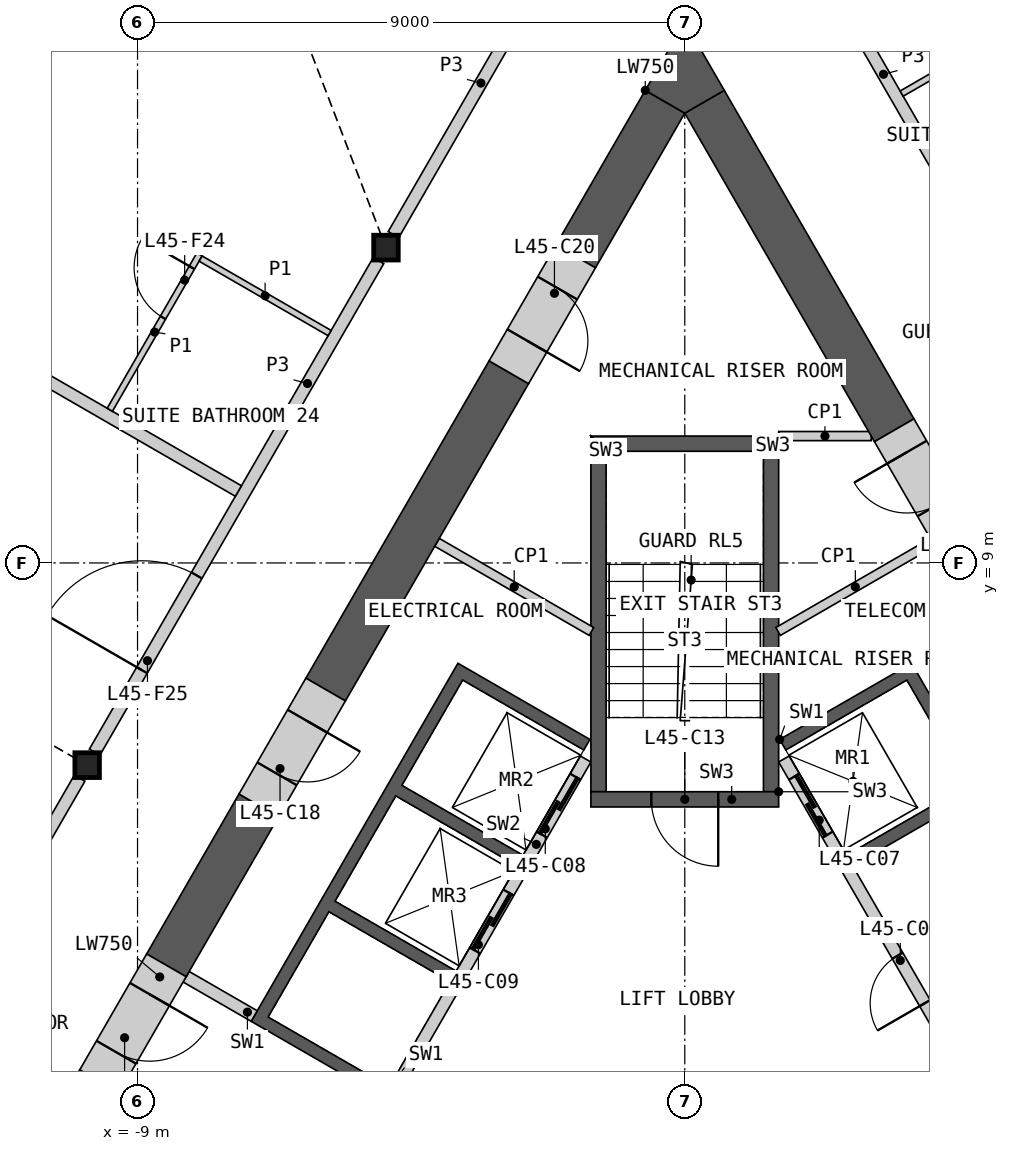
"""IFC4 building model, lengths in metres.
Left out: names, types, materials, properties, quantities, classifications, styles, units other than length and angle.
Written with IfcOpenShell. Run it as: python <this file> out.ifc"""

import sys

from ifc_helpers import new_model, si_unit, direction, frame, frame_2d, origin, origin_2d, place, context, subcontext, project, spatial, polyline, rectangle, i_section, outline, extrude, element, fill, save


model = new_model("IFC4")
c1 = context("Model", 3, precision=1e-05, world=origin(), true_north=direction((0.0, 1.0)))
c2 = subcontext(c1, "Body", "Model", "MODEL_VIEW")
j1 = project(units=[si_unit("LENGTHUNIT", "METRE"), si_unit("PLANEANGLEUNIT", "RADIAN")], contexts=[c1])
p1 = place(None, origin())
s1 = spatial("IfcSite", under=j1, at=p1, CompositionType="ELEMENT")
p2 = place(p1, origin())
s2 = spatial("IfcBuilding", under=s1, at=p2, CompositionType="ELEMENT")
p3 = place(p2, frame((0.0, 0.0, 205.2)))
s3 = spatial("IfcBuildingStorey", under=s2, at=p3, CompositionType="ELEMENT", Elevation=205.2)
for number, where, z_axis, x_axis in (
    (1, (-4.914, 14.186, 0.0), (0.0, 0.0, 1.0), (1.0, 0.0, 0.0)),
    (2, (-9.828, 5.675, 0.0), (0.0, 0.0, 1.0), (1.0, 0.0, 0.0)),
):
    element("IfcColumn", number, at=place(p3, frame(where, z_axis=z_axis, x_axis=x_axis)), inside=s3, PredefinedType="COLUMN", context=c2, shape_type="SweptSolid", body=[
        extrude(i_section(OverallWidth=0.404, OverallDepth=0.407, WebThickness=0.027, FlangeThickness=0.044, at=origin_2d()), origin(), (0.0, 0.0, 1.0), 3.6),
    ])
p4 = place(p3, origin())
e3 = element("IfcWall", 3, at=p4, inside=s3, PredefinedType="SHEAR", context=c2, shape_type="SweptSolid", body=[
    extrude(outline(polyline([(1.561, 6.097), (3.731, 7.35), (7.131, 1.461), (4.96, 0.208), (4.861, 0.381), (6.852, 1.531), (4.752, 5.169), (2.76, 4.019), (2.66, 4.192), (4.652, 5.342), (3.652, 7.074), (1.66, 5.924), (1.561, 6.097)])), origin(), (0.0, 0.0, 1.0), 3.25),
])
p5 = place(p3, frame((5.817, -1.476, 0.0), z_axis=(0.0, 0.0, 1.0), x_axis=(-0.500002616675, 0.866023893041, 0.0)))
e4 = element("IfcWall", 4, at=p5, inside=s3, PredefinedType="SOLIDWALL", context=c2, shape_type="SweptSolid", body=[
    extrude(rectangle(XDim=8.373, YDim=0.2, at=frame_2d((4.187, 0.0))), origin(), (0.0, 0.0, 1.0), 3.25),
])
p6 = place(p5, frame((0.437, 0.0, 0.0)))
e5 = element("IfcOpeningElement", 5, at=p6, cuts=e4, PredefinedType="OPENING", context=c2, shape_type="SweptSolid", body=[
    extrude(rectangle(XDim=0.9, YDim=2.1, at=frame_2d((0.45, 1.05))), frame((0.0, 0.11, 0.0), z_axis=(0.0, -1.0, 0.0), x_axis=(1.0, 0.0, 0.0)), (0.0, 0.0, 1.0), 0.22),
])
p7 = place(p5, frame((3.737, 0.0, 0.0)))
e6 = element("IfcOpeningElement", 6, at=p7, cuts=e4, PredefinedType="OPENING", context=c2, shape_type="SweptSolid", body=[
    extrude(rectangle(XDim=0.9, YDim=2.1, at=frame_2d((0.45, 1.05))), frame((0.0, 0.11, 0.0), z_axis=(0.0, -1.0, 0.0), x_axis=(1.0, 0.0, 0.0)), (0.0, 0.0, 1.0), 0.22),
])
p8 = place(p5, frame((6.937, 0.0, 0.0)))
e7 = element("IfcOpeningElement", 7, at=p8, cuts=e4, PredefinedType="OPENING", context=c2, shape_type="SweptSolid", body=[
    extrude(rectangle(XDim=1.1, YDim=2.1, at=frame_2d((0.55, 1.05))), frame((0.0, 0.11, 0.0), z_axis=(0.0, -1.0, 0.0), x_axis=(1.0, 0.0, 0.0)), (0.0, 0.0, 1.0), 0.22),
])
p9 = place(p3, origin())
e8 = element("IfcWall", 8, at=p9, inside=s3, PredefinedType="SHEAR", context=c2, shape_type="SweptSolid", body=[
    extrude(outline(polyline([(-4.96, 0.208), (-7.131, 1.461), (-3.731, 7.35), (-1.561, 6.097), (-1.66, 5.924), (-3.652, 7.074), (-4.652, 5.342), (-2.66, 4.192), (-2.76, 4.019), (-4.752, 5.169), (-5.752, 3.437), (-3.76, 2.287), (-3.861, 2.113), (-5.852, 3.263), (-6.852, 1.531), (-4.861, 0.381), (-4.96, 0.208)])), origin(), (0.0, 0.0, 1.0), 3.25),
])
p10 = place(p3, frame((-1.631, 5.776, 0.0), z_axis=(0.0, 0.0, 1.0), x_axis=(-0.499992876559, -0.866029516466, 0.0)))
e9 = element("IfcWall", 9, at=p10, inside=s3, PredefinedType="SOLIDWALL", context=c2, shape_type="SweptSolid", body=[
    extrude(rectangle(XDim=6.486, YDim=0.2, at=frame_2d((3.243, 0.0))), origin(), (0.0, 0.0, 1.0), 3.25),
])
p11 = place(p10, frame((0.337, 0.0, 0.0)))
e10 = element("IfcOpeningElement", 10, at=p11, cuts=e9, PredefinedType="OPENING", context=c2, shape_type="SweptSolid", body=[
    extrude(rectangle(XDim=1.1, YDim=2.1, at=frame_2d((0.55, 1.05))), frame((0.0, 0.11, 0.0), z_axis=(0.0, -1.0, 0.0), x_axis=(1.0, 0.0, 0.0)), (0.0, 0.0, 1.0), 0.22),
])
p12 = place(p10, frame((2.537, 0.0, 0.0)))
e11 = element("IfcOpeningElement", 11, at=p12, cuts=e9, PredefinedType="OPENING", context=c2, shape_type="SweptSolid", body=[
    extrude(rectangle(XDim=1.1, YDim=2.1, at=frame_2d((0.55, 1.05))), frame((0.0, 0.11, 0.0), z_axis=(0.0, -1.0, 0.0), x_axis=(1.0, 0.0, 0.0)), (0.0, 0.0, 1.0), 0.22),
])
p13 = place(p3, frame((-7.081, 1.548, 0.0), z_axis=(0.0, 0.0, 1.0), x_axis=(-0.866003189247, 0.500038474733, 0.0)))
e12 = element("IfcWall", 12, at=p13, inside=s3, PredefinedType="SHEAR", context=c2, shape_type="SweptSolid", body=[
    extrude(rectangle(XDim=1.293, YDim=0.2, at=frame_2d((0.646, 0.0))), origin(), (0.0, 0.0, 1.0), 3.25),
])
p14 = place(p3, origin())
e13 = element("IfcWall", 13, at=p14, inside=s3, PredefinedType="SHEAR", context=c2, shape_type="SweptSolid", body=[
    extrude(outline(polyline([(1.544, 5.237), (1.544, 11.087), (1.294, 10.837), (1.294, 5.237), (1.544, 5.237)])), origin(), (0.0, 0.0, 1.0), 3.25),
])
p15 = place(p3, origin())
e14 = element("IfcWall", 14, at=p15, inside=s3, PredefinedType="SHEAR", context=c2, shape_type="SweptSolid", body=[
    extrude(outline(polyline([(1.544, 11.087), (-1.544, 11.087), (-1.294, 10.837), (1.294, 10.837), (1.544, 11.087)])), origin(), (0.0, 0.0, 1.0), 3.25),
])
p16 = place(p3, origin())
e15 = element("IfcWall", 15, at=p16, inside=s3, PredefinedType="SHEAR", context=c2, shape_type="SweptSolid", body=[
    extrude(outline(polyline([(-1.294, 10.837), (-1.544, 11.087), (-1.544, 5.237), (-1.294, 5.237), (-1.294, 10.837)])), origin(), (0.0, 0.0, 1.0), 3.25),
])
p17 = place(p3, frame((1.544, 5.112, 0.0), z_axis=(0.0, 0.0, 1.0), x_axis=(-1.0, 0.0, 0.0)))
e16 = element("IfcWall", 16, at=p17, inside=s3, PredefinedType="SHEAR", context=c2, shape_type="SweptSolid", body=[
    extrude(rectangle(XDim=3.088, YDim=0.25, at=frame_2d((1.544, 0.0))), origin(), (0.0, 0.0, 1.0), 3.25),
])
p18 = place(p17, frame((0.994, 0.0, 0.0)))
e17 = element("IfcOpeningElement", 17, at=p18, cuts=e16, PredefinedType="OPENING", context=c2, shape_type="SweptSolid", body=[
    extrude(rectangle(XDim=1.1, YDim=2.1, at=frame_2d((0.55, 1.05))), frame((0.0, 0.135, 0.0), z_axis=(0.0, -1.0, 0.0), x_axis=(1.0, 0.0, 0.0)), (0.0, 0.0, 1.0), 0.27),
])
for number, where, z_axis, x_axis in (
    (18, (-4.075, 9.339, 0.0), (0.0, 0.0, 1.0), (0.866, -0.5, 0.0)),
    (19, (4.075, 9.339, 0.0), (0.0, 0.0, 1.0), (-0.866, -0.5, 0.0)),
):
    element("IfcWall", number, at=place(p3, frame(where, z_axis=z_axis, x_axis=x_axis)), inside=s3, PredefinedType="PARTITIONING", context=c2, shape_type="SweptSolid", body=[
        extrude(rectangle(XDim=2.933, YDim=0.15, at=frame_2d((1.466, 0.0))), origin(), (0.0, 0.0, 1.0), 3.25),
    ])
p19 = place(p3, frame((1.544, 11.087, 0.0), z_axis=(0.0, 0.0, 1.0), x_axis=(1.0, 0.0, 0.0)))
e20 = element("IfcWall", 20, at=p19, inside=s3, PredefinedType="PARTITIONING", context=c2, shape_type="SweptSolid", body=[
    extrude(rectangle(XDim=1.522, YDim=0.15, at=frame_2d((0.761, 0.0))), origin(), (0.0, 0.0, 1.0), 3.25),
])
p20 = place(p3, frame((3.444, 11.182, 0.0), z_axis=(0.0, 0.0, 1.0), x_axis=(-0.499985517215, 0.866033765263, 0.0)))
e21 = element("IfcWall", 21, at=p20, inside=s3, PredefinedType="SHEAR", context=c2, shape_type="SweptSolid", body=[
    extrude(rectangle(XDim=6.24, YDim=0.75, at=frame_2d((3.12, 0.0))), origin(), (0.0, 0.0, 1.0), 3.25),
])
p21 = place(p3, frame((-2.894, 12.136, 0.0), z_axis=(0.0, 0.0, 1.0), x_axis=(-0.500021737671, -0.866012853171, 0.0)))
e22 = element("IfcWall", 22, at=p21, inside=s3, PredefinedType="SHEAR", context=c2, shape_type="SweptSolid", body=[
    extrude(rectangle(XDim=6.026, YDim=0.75, at=frame_2d((3.013, 0.0))), origin(), (0.0, 0.0, 1.0), 3.25),
])
p22 = place(p3, frame((-7.006, 5.012, 0.0), z_axis=(0.0, 0.0, 1.0), x_axis=(-0.49996826437, -0.866043725583, 0.0)))
e23 = element("IfcWall", 23, at=p22, inside=s3, PredefinedType="SHEAR", context=c2, shape_type="SweptSolid", body=[
    extrude(rectangle(XDim=3.038, YDim=0.75, at=frame_2d((1.519, 0.0))), origin(), (0.0, 0.0, 1.0), 3.25),
])
p23 = place(p3, frame((-0.325, 16.585, 0.0), z_axis=(0.0, 0.0, 1.0), x_axis=(-0.500026977578, -0.866009827712, 0.0)))
e24 = element("IfcWall", 24, at=p23, inside=s3, PredefinedType="SHEAR", context=c2, shape_type="SweptSolid", body=[
    extrude(rectangle(XDim=2.938, YDim=0.75, at=frame_2d((1.469, 0.0))), origin(), (0.0, 0.0, 1.0), 3.25),
])
p24 = place(p3, origin())
e25 = element("IfcWall", 25, at=p24, inside=s3, PredefinedType="SHEAR", context=c2, shape_type="SweptSolid", body=[
    extrude(outline(polyline([(-0.649, 16.773), (0.0, 17.898), (0.649, 16.773), (0.0, 16.398), (-0.649, 16.773)])), origin(), (0.0, 0.0, 1.0), 3.25),
])
p25 = place(p3, frame((-5.906, 6.918, 0.0), z_axis=(0.0, 0.0, 1.0), x_axis=(-0.499946605688, -0.86605622881, 0.0)))
e26 = element("IfcWall", 26, at=p25, inside=s3, PredefinedType="SHEAR", context=c2, shape_type="SweptSolid", body=[
    extrude(rectangle(XDim=2.2, YDim=0.75, at=frame_2d((1.1, 0.0))), origin(), (0.0, 0.0, 1.0), 3.25),
])
p26 = place(p25, frame((0.6, 0.0, 0.0)))
e27 = element("IfcOpeningElement", 27, at=p26, cuts=e26, PredefinedType="OPENING", context=c2, shape_type="SweptSolid", body=[
    extrude(rectangle(XDim=1.0, YDim=2.1, at=frame_2d((0.5, 1.05))), frame((0.0, 0.385, 0.0), z_axis=(0.0, -1.0, 0.0), x_axis=(1.0, 0.0, 0.0)), (0.0, 0.0, 1.0), 0.77),
])
p27 = place(p3, frame((-1.794, 14.041, 0.0), z_axis=(0.0, 0.0, 1.0), x_axis=(-0.499946605688, -0.86605622881, 0.0)))
e28 = element("IfcWall", 28, at=p27, inside=s3, PredefinedType="SHEAR", context=c2, shape_type="SweptSolid", body=[
    extrude(rectangle(XDim=2.2, YDim=0.75, at=frame_2d((1.1, 0.0))), origin(), (0.0, 0.0, 1.0), 3.25),
])
p28 = place(p27, frame((0.6, 0.0, 0.0)))
e29 = element("IfcOpeningElement", 29, at=p28, cuts=e28, PredefinedType="OPENING", context=c2, shape_type="SweptSolid", body=[
    extrude(rectangle(XDim=1.0, YDim=2.1, at=frame_2d((0.5, 1.05))), frame((0.0, 0.385, 0.0), z_axis=(0.0, -1.0, 0.0), x_axis=(1.0, 0.0, 0.0)), (0.0, 0.0, 1.0), 0.77),
])
p29 = place(p3, frame((-9.625, 0.477, 0.0), z_axis=(0.0, 0.0, 1.0), x_axis=(-0.500005104963, -0.866022456413, 0.0)))
e30 = element("IfcWall", 30, at=p29, inside=s3, PredefinedType="SHEAR", context=c2, shape_type="SweptSolid", body=[
    extrude(rectangle(XDim=2.941, YDim=0.75, at=frame_2d((1.47, 0.0))), origin(), (0.0, 0.0, 1.0), 3.25),
])
p30 = place(p29, frame((1.35, 0.0, 0.0)))
e31 = element("IfcOpeningElement", 31, at=p30, cuts=e30, PredefinedType="OPENING", context=c2, shape_type="SweptSolid", body=[
    extrude(rectangle(XDim=1.0, YDim=2.1, at=frame_2d((0.5, 1.05))), frame((0.0, 0.385, 0.0), z_axis=(0.0, -1.0, 0.0), x_axis=(1.0, 0.0, 0.0)), (0.0, 0.0, 1.0), 0.77),
])
p31 = place(p3, frame((4.353, 9.609, 0.0), z_axis=(0.0, 0.0, 1.0), x_axis=(-0.500071537347, 0.865984097738, 0.0)))
e32 = element("IfcWall", 32, at=p31, inside=s3, PredefinedType="SHEAR", context=c2, shape_type="SweptSolid", body=[
    extrude(rectangle(XDim=1.816, YDim=0.75, at=frame_2d((0.908, 0.0))), origin(), (0.0, 0.0, 1.0), 3.25),
])
p32 = place(p31, frame((0.4, 0.0, 0.0)))
e33 = element("IfcOpeningElement", 33, at=p32, cuts=e32, PredefinedType="OPENING", context=c2, shape_type="SweptSolid", body=[
    extrude(rectangle(XDim=1.0, YDim=2.1, at=frame_2d((0.5, 1.05))), frame((0.0, 0.385, 0.0), z_axis=(0.0, -1.0, 0.0), x_axis=(1.0, 0.0, 0.0)), (0.0, 0.0, 1.0), 0.77),
])
p33 = place(p3, frame((-8.525, 2.382, 0.0), z_axis=(0.0, 0.0, 1.0), x_axis=(-0.500077893725, -0.86598042715, 0.0)))
e34 = element("IfcWall", 34, at=p33, inside=s3, PredefinedType="SHEAR", context=c2, shape_type="SweptSolid", body=[
    extrude(rectangle(XDim=2.2, YDim=0.75, at=frame_2d((1.1, 0.0))), origin(), (0.0, 0.0, 1.0), 3.25),
])
p34 = place(p33, frame((0.55, 0.0, 0.0)))
e35 = element("IfcOpeningElement", 35, at=p34, cuts=e34, PredefinedType="OPENING", context=c2, shape_type="SweptSolid", body=[
    extrude(rectangle(XDim=1.1, YDim=2.1, at=frame_2d((0.55, 1.05))), frame((0.0, 0.385, 0.0), z_axis=(0.0, -1.0, 0.0), x_axis=(1.0, 0.0, 0.0)), (0.0, 0.0, 1.0), 0.77),
])
p35 = place(p3, frame((-9.705, 5.888, 0.0), z_axis=(0.0, 0.0, 1.0), x_axis=(0.50000393355, 0.866023132736, 0.0)))
e36 = element("IfcWall", 36, at=p35, inside=s3, PredefinedType="PARTITIONING", context=c2, shape_type="SweptSolid", body=[
    extrude(rectangle(XDim=9.335, YDim=0.2, at=frame_2d((4.667, 0.0))), origin(), (0.0, 0.0, 1.0), 3.25),
])
p36 = place(p35, frame((1.556, 0.0, 0.0)))
e37 = element("IfcOpeningElement", 37, at=p36, cuts=e36, PredefinedType="OPENING", context=c2, shape_type="SweptSolid", body=[
    extrude(rectangle(XDim=1.8, YDim=2.1, at=frame_2d((0.9, 1.05))), frame((0.0, 0.11, 0.0), z_axis=(0.0, -1.0, 0.0), x_axis=(1.0, 0.0, 0.0)), (0.0, 0.0, 1.0), 0.22),
])
p37 = place(p3, frame((-14.619, -2.624, 0.0), z_axis=(0.0, 0.0, 1.0), x_axis=(0.50000393355, 0.866023132736, 0.0)))
e38 = element("IfcWall", 38, at=p37, inside=s3, PredefinedType="PARTITIONING", context=c2, shape_type="SweptSolid", body=[
    extrude(rectangle(XDim=9.335, YDim=0.2, at=frame_2d((4.667, 0.0))), origin(), (0.0, 0.0, 1.0), 3.25),
])
p38 = place(p37, frame((3.163, 0.0, 0.0)))
e39 = element("IfcOpeningElement", 39, at=p38, cuts=e38, PredefinedType="OPENING", context=c2, shape_type="SweptSolid", body=[
    extrude(rectangle(XDim=1.0, YDim=2.1, at=frame_2d((0.5, 1.05))), frame((0.0, 0.11, 0.0), z_axis=(0.0, -1.0, 0.0), x_axis=(1.0, 0.0, 0.0)), (0.0, 0.0, 1.0), 0.22),
])
p39 = place(p3, frame((-4.791, 14.4, 0.0), z_axis=(0.0, 0.0, 1.0), x_axis=(0.50000762079, 0.866021003874, 0.0)))
e40 = element("IfcWall", 40, at=p39, inside=s3, PredefinedType="PARTITIONING", context=c2, shape_type="SweptSolid", body=[
    extrude(rectangle(XDim=5.756, YDim=0.2, at=frame_2d((2.878, 0.0))), origin(), (0.0, 0.0, 1.0), 3.25),
])
p40 = place(p39, frame((4.304, 0.0, 0.0)))
e41 = element("IfcOpeningElement", 41, at=p40, cuts=e40, PredefinedType="OPENING", context=c2, shape_type="SweptSolid", body=[
    extrude(rectangle(XDim=1.1, YDim=2.1, at=frame_2d((0.55, 1.05))), frame((0.0, 0.11, 0.0), z_axis=(0.0, -1.0, 0.0), x_axis=(1.0, 0.0, 0.0)), (0.0, 0.0, 1.0), 0.22),
])
p41 = place(p3, frame((1.913, 19.385, 0.0), z_axis=(0.0, 0.0, 1.0), x_axis=(0.499961611314, -0.866047566368, 0.0)))
e42 = element("IfcWall", 42, at=p41, inside=s3, PredefinedType="PARTITIONING", context=c2, shape_type="SweptSolid", body=[
    extrude(rectangle(XDim=5.42, YDim=0.2, at=frame_2d((2.71, 0.0))), origin(), (0.0, 0.0, 1.0), 3.25),
])
p42 = place(p41, frame((0.351, 0.0, 0.0)))
e43 = element("IfcOpeningElement", 43, at=p42, cuts=e42, PredefinedType="OPENING", context=c2, shape_type="SweptSolid", body=[
    extrude(rectangle(XDim=1.1, YDim=2.1, at=frame_2d((0.55, 1.05))), frame((0.0, 0.11, 0.0), z_axis=(0.0, -1.0, 0.0), x_axis=(1.0, 0.0, 0.0)), (0.0, 0.0, 1.0), 0.22),
])
p43 = place(p3, frame((-14.39, 14.252, 0.0), z_axis=(0.0, 0.0, 1.0), x_axis=(0.866028741424, -0.499994218994, 0.0)))
e44 = element("IfcWall", 44, at=p43, inside=s3, PredefinedType="PARTITIONING", context=c2, shape_type="SweptSolid", body=[
    extrude(rectangle(XDim=8.139, YDim=0.2, at=frame_2d((4.07, 0.0))), origin(), (0.0, 0.0, 1.0), 2.404),
])
p44 = place(p3, frame((-9.456, 11.519, 0.0), z_axis=(0.0, 0.0, 1.0), x_axis=(0.499939757307, 0.866060182126, 0.0)))
e45 = element("IfcWall", 45, at=p44, inside=s3, PredefinedType="PARTITIONING", context=c2, shape_type="SweptSolid", body=[
    extrude(rectangle(XDim=2.95, YDim=0.1, at=frame_2d((1.475, 0.0))), origin(), (0.0, 0.0, 1.0), 2.404),
])
p45 = place(p44, frame((1.75, 0.0, 0.0)))
e46 = element("IfcOpeningElement", 46, at=p45, cuts=e45, PredefinedType="OPENING", context=c2, shape_type="SweptSolid", body=[
    extrude(rectangle(XDim=0.95, YDim=2.1, at=frame_2d((0.475, 1.05))), frame((0.0, 0.06, 0.0), z_axis=(0.0, -1.0, 0.0), x_axis=(1.0, 0.0, 0.0)), (0.0, 0.0, 1.0), 0.12),
])
p46 = place(p3, frame((-7.963, 14.006, 0.0), z_axis=(0.0, 0.0, 1.0), x_axis=(0.866057815567, -0.499943856944, 0.0)))
e47 = element("IfcWall", 47, at=p46, inside=s3, PredefinedType="PARTITIONING", context=c2, shape_type="SweptSolid", body=[
    extrude(rectangle(XDim=2.45, YDim=0.1, at=frame_2d((1.225, 0.0))), origin(), (0.0, 0.0, 1.0), 2.404),
])
p47 = place(p3, frame((3.567, 16.719, 0.0), z_axis=(0.0, 0.0, 1.0), x_axis=(0.866014668023, 0.500018594424, 0.0)))
e48 = element("IfcWall", 48, at=p47, inside=s3, PredefinedType="PARTITIONING", context=c2, shape_type="SweptSolid", body=[
    extrude(rectangle(XDim=2.45, YDim=0.1, at=frame_2d((1.225, 0.0))), origin(), (0.0, 0.0, 1.0), 2.404),
])
p48 = place(p7, origin())
e49 = element("IfcDoor", 49, at=p48, inside=s3, OperationType="SINGLE_SWING_LEFT", PredefinedType="DOOR", context=c2, shape_type="SweptSolid", body=[
    extrude(rectangle(XDim=0.9, YDim=2.1, at=frame_2d((0.45, 1.05))), frame((0.0, 0.025, 0.0), z_axis=(0.0, -1.0, 0.0), x_axis=(1.0, 0.0, 0.0)), (0.0, 0.0, 1.0), 0.05),
])
fill(e6, e49)
p49 = place(p8, origin())
e50 = element("IfcDoor", 50, at=p49, inside=s3, OperationType="SLIDING_TO_LEFT", PredefinedType="DOOR", context=c2, shape_type="SweptSolid", body=[
    extrude(rectangle(XDim=1.1, YDim=2.1, at=frame_2d((0.55, 1.05))), frame((0.0, 0.025, 0.0), z_axis=(0.0, -1.0, 0.0), x_axis=(1.0, 0.0, 0.0)), (0.0, 0.0, 1.0), 0.05),
])
fill(e7, e50)
p50 = place(p11, origin())
e51 = element("IfcDoor", 51, at=p50, inside=s3, OperationType="SLIDING_TO_LEFT", PredefinedType="DOOR", context=c2, shape_type="SweptSolid", body=[
    extrude(rectangle(XDim=1.1, YDim=2.1, at=frame_2d((0.55, 1.05))), frame((0.0, 0.025, 0.0), z_axis=(0.0, -1.0, 0.0), x_axis=(1.0, 0.0, 0.0)), (0.0, 0.0, 1.0), 0.05),
])
fill(e10, e51)
p51 = place(p12, origin())
e52 = element("IfcDoor", 52, at=p51, inside=s3, OperationType="SLIDING_TO_LEFT", PredefinedType="DOOR", context=c2, shape_type="SweptSolid", body=[
    extrude(rectangle(XDim=1.1, YDim=2.1, at=frame_2d((0.55, 1.05))), frame((0.0, 0.025, 0.0), z_axis=(0.0, -1.0, 0.0), x_axis=(1.0, 0.0, 0.0)), (0.0, 0.0, 1.0), 0.05),
])
fill(e11, e52)
p52 = place(p18, origin())
e53 = element("IfcDoor", 53, at=p52, inside=s3, OperationType="SINGLE_SWING_LEFT", PredefinedType="DOOR", context=c2, shape_type="SweptSolid", body=[
    extrude(rectangle(XDim=1.1, YDim=2.1, at=frame_2d((0.55, 1.05))), frame((0.0, 0.025, 0.0), z_axis=(0.0, -1.0, 0.0), x_axis=(1.0, 0.0, 0.0)), (0.0, 0.0, 1.0), 0.05),
])
fill(e17, e53)
p53 = place(p26, origin())
e54 = element("IfcDoor", 54, at=p53, inside=s3, OperationType="SINGLE_SWING_LEFT", PredefinedType="DOOR", context=c2, shape_type="SweptSolid", body=[
    extrude(rectangle(XDim=1.0, YDim=2.1, at=frame_2d((0.5, 1.05))), frame((0.0, 0.13, 0.0), z_axis=(0.0, -1.0, 0.0), x_axis=(1.0, 0.0, 0.0)), (0.0, 0.0, 1.0), 0.05),
])
fill(e27, e54)
p54 = place(p28, origin())
e55 = element("IfcDoor", 55, at=p54, inside=s3, OperationType="SINGLE_SWING_RIGHT", PredefinedType="DOOR", context=c2, shape_type="SweptSolid", body=[
    extrude(rectangle(XDim=1.0, YDim=2.1, at=frame_2d((0.5, 1.05))), frame((0.0, 0.13, 0.0), z_axis=(0.0, -1.0, 0.0), x_axis=(1.0, 0.0, 0.0)), (0.0, 0.0, 1.0), 0.05),
])
fill(e29, e55)
p55 = place(p32, origin())
e56 = element("IfcDoor", 56, at=p55, inside=s3, OperationType="SINGLE_SWING_RIGHT", PredefinedType="DOOR", context=c2, shape_type="SweptSolid", body=[
    extrude(rectangle(XDim=1.0, YDim=2.1, at=frame_2d((0.5, 1.05))), frame((0.0, 0.13, 0.0), z_axis=(0.0, -1.0, 0.0), x_axis=(1.0, 0.0, 0.0)), (0.0, 0.0, 1.0), 0.05),
])
fill(e33, e56)
p56 = place(p34, origin())
e57 = element("IfcDoor", 57, at=p56, inside=s3, OperationType="SINGLE_SWING_LEFT", PredefinedType="DOOR", context=c2, shape_type="SweptSolid", body=[
    extrude(rectangle(XDim=1.1, YDim=2.1, at=frame_2d((0.55, 1.05))), frame((0.0, 0.13, 0.0), z_axis=(0.0, -1.0, 0.0), x_axis=(1.0, 0.0, 0.0)), (0.0, 0.0, 1.0), 0.05),
])
fill(e35, e57)
p57 = place(p45, origin())
e58 = element("IfcDoor", 58, at=p57, inside=s3, OperationType="SINGLE_SWING_RIGHT", PredefinedType="DOOR", context=c2, shape_type="SweptSolid", body=[
    extrude(rectangle(XDim=0.95, YDim=2.1, at=frame_2d((0.475, 1.05))), frame((0.0, 0.025, 0.0), z_axis=(0.0, -1.0, 0.0), x_axis=(1.0, 0.0, 0.0)), (0.0, 0.0, 1.0), 0.05),
])
fill(e46, e58)
p58 = place(p36, origin())
e59 = element("IfcDoor", 59, at=p58, inside=s3, OperationType="DOUBLE_DOOR_SINGLE_SWING", PredefinedType="DOOR", context=c2, shape_type="SweptSolid", body=[
    extrude(rectangle(XDim=1.8, YDim=2.1, at=frame_2d((0.9, 1.05))), frame((0.0, 0.025, 0.0), z_axis=(0.0, -1.0, 0.0), x_axis=(1.0, 0.0, 0.0)), (0.0, 0.0, 1.0), 0.05),
])
fill(e37, e59)
save(model, sys.argv[1])
